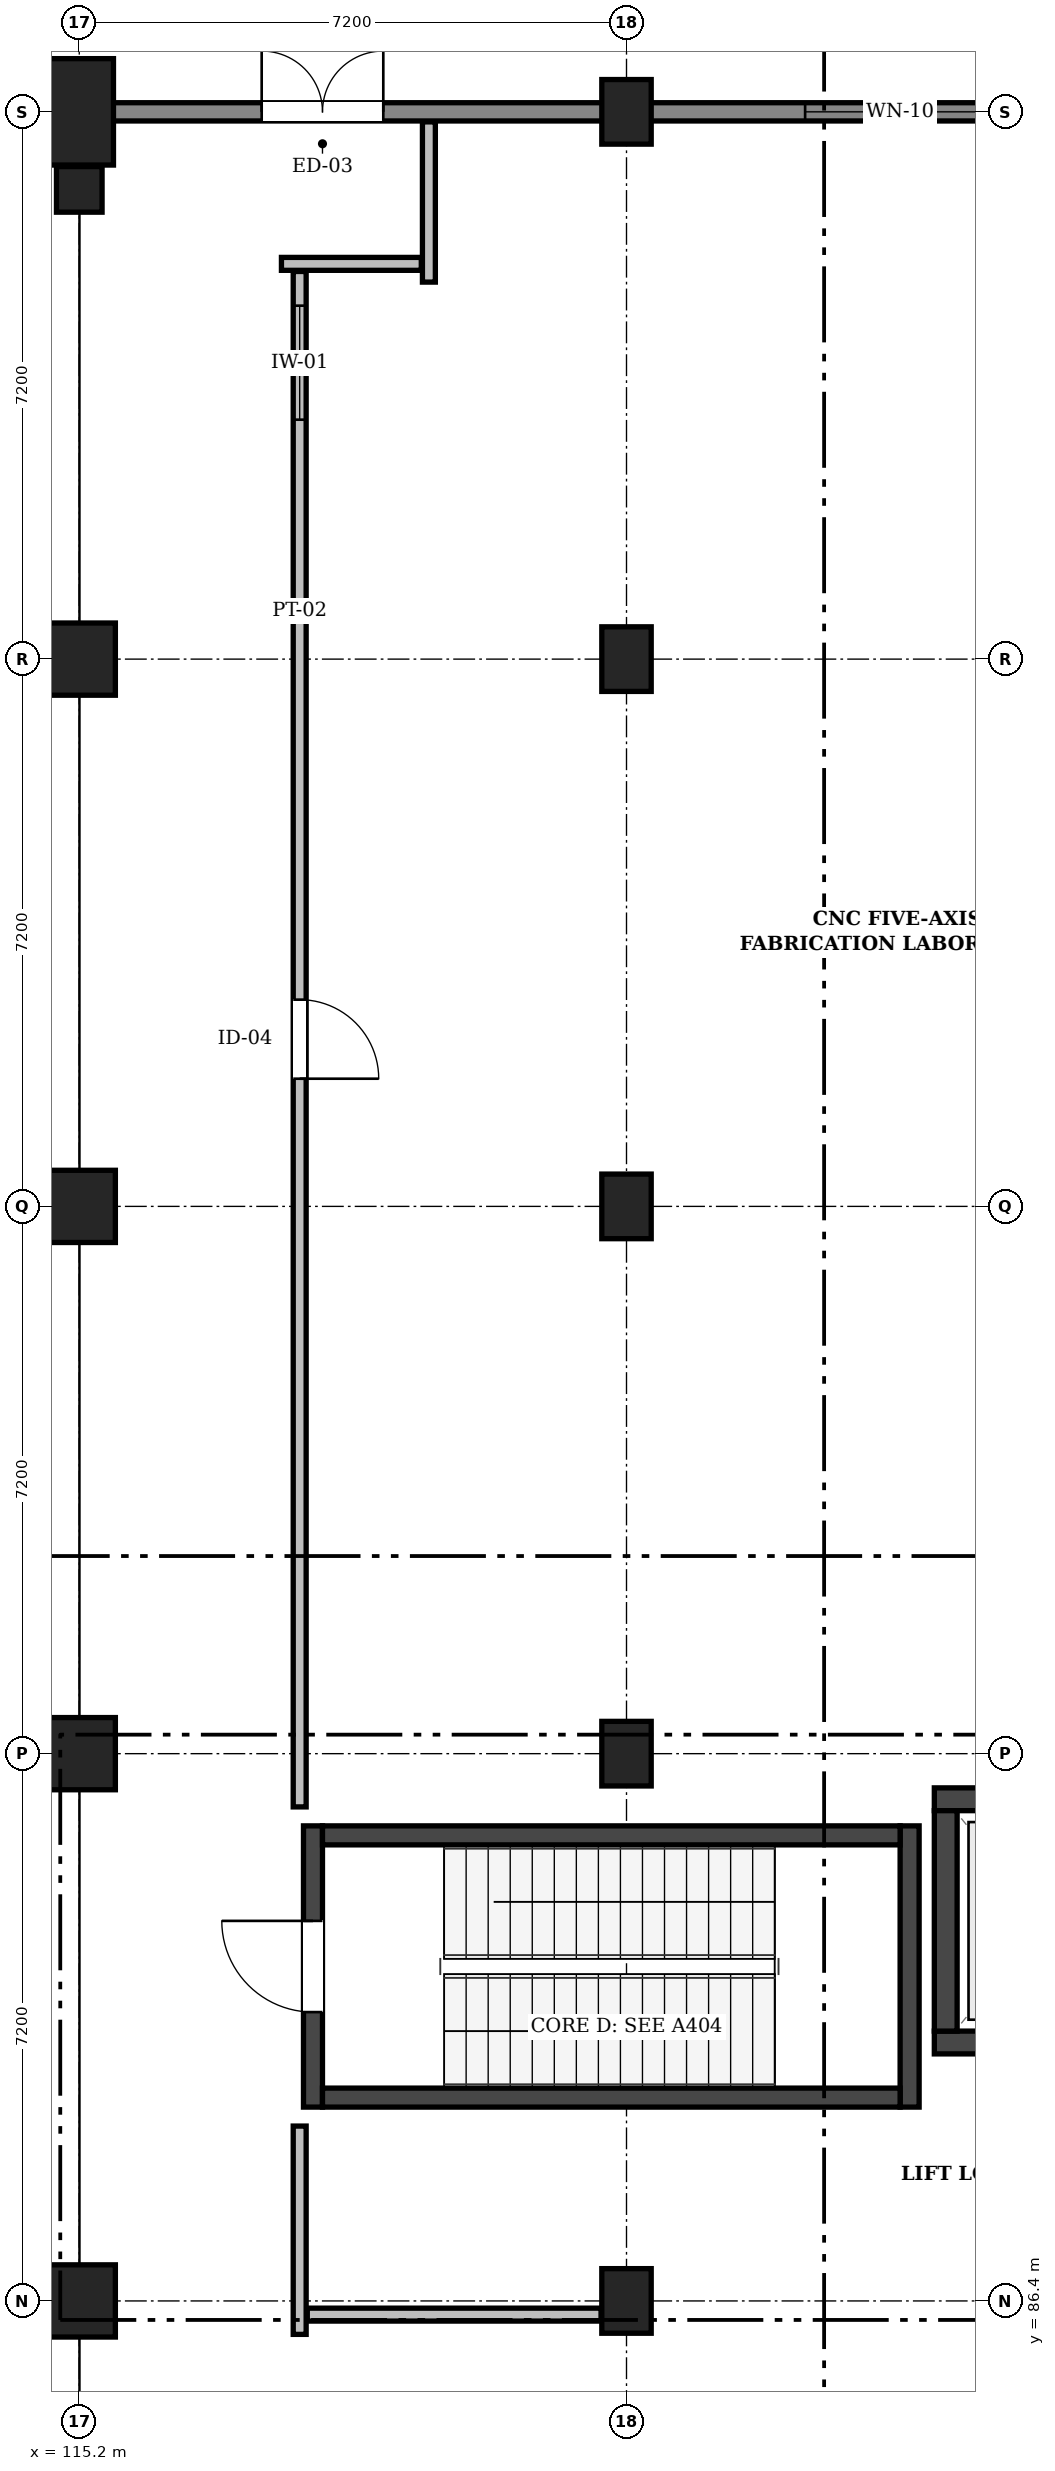
"""IFC4 building model, lengths in metres.
Left out: names, types, materials, properties, quantities, classifications, styles, units other than length and angle.
Written with IfcOpenShell. Run it as: python <this file> out.ifc"""

import sys

from ifc_helpers import new_model, si_unit, direction, frame, frame_2d, origin, origin_2d, place, context, subcontext, project, spatial, rectangle, extrude, element, fill, save


model = new_model("IFC4")
c1 = context("Model", 3, precision=1e-05, world=origin(), true_north=direction((0.0, 1.0)))
c2 = subcontext(c1, "Body", "Model", "MODEL_VIEW")
j1 = project(units=[si_unit("LENGTHUNIT", "METRE"), si_unit("PLANEANGLEUNIT", "RADIAN")], contexts=[c1])
p1 = place(None, origin())
s1 = spatial("IfcSite", under=j1, at=p1, CompositionType="ELEMENT")
p2 = place(p1, origin())
s2 = spatial("IfcBuilding", under=s1, at=p2, CompositionType="ELEMENT")
p3 = place(p2, origin())
s3 = spatial("IfcBuildingStorey", under=s2, at=p3, CompositionType="ELEMENT", Elevation=0.0)
for number, where, z_axis, x_axis in (
    (1, (115.2, 86.4, 0.0), (0.0, 0.0, 1.0), (1.0, 0.0, 0.0)),
    (2, (115.2, 93.6, 0.0), (0.0, 0.0, 1.0), (1.0, 0.0, 0.0)),
    (3, (115.2, 100.8, 0.0), (0.0, 0.0, 1.0), (1.0, 0.0, 0.0)),
    (4, (115.2, 108.0, 0.0), (0.0, 0.0, 1.0), (1.0, 0.0, 0.0)),
):
    element("IfcColumn", number, at=place(p3, frame(where, z_axis=z_axis, x_axis=x_axis)), inside=s3, PredefinedType="COLUMN", context=c2, shape_type="SweptSolid", body=[
        extrude(rectangle(XDim=0.95, YDim=0.95, at=origin_2d()), origin(), (0.0, 0.0, 1.0), 4.8),
    ])
p4 = place(p3, frame((115.2, 115.2, 0.0), z_axis=(0.0, 0.0, 1.0), x_axis=(1.0, 0.0, 0.0)))
e5 = element("IfcColumn", 5, at=p4, inside=s3, PredefinedType="COLUMN", context=c2, shape_type="SweptSolid", body=[
    extrude(rectangle(XDim=0.9, YDim=1.4, at=origin_2d()), origin(), (0.0, 0.0, 1.0), 4.8),
])
for number, where, z_axis, x_axis in (
    (6, (122.4, 86.4, 0.0), (0.0, 0.0, 1.0), (1.0, 0.0, 0.0)),
    (7, (122.4, 93.6, 0.0), (0.0, 0.0, 1.0), (1.0, 0.0, 0.0)),
    (8, (122.4, 100.8, 0.0), (0.0, 0.0, 1.0), (1.0, 0.0, 0.0)),
    (9, (122.4, 108.0, 0.0), (0.0, 0.0, 1.0), (1.0, 0.0, 0.0)),
    (10, (122.4, 115.2, 0.0), (0.0, 0.0, 1.0), (1.0, 0.0, 0.0)),
):
    element("IfcColumn", number, at=place(p3, frame(where, z_axis=z_axis, x_axis=x_axis)), inside=s3, PredefinedType="COLUMN", context=c2, shape_type="SweptSolid", body=[
        extrude(rectangle(XDim=0.65, YDim=0.85, at=origin_2d()), origin(), (0.0, 0.0, 1.0), 4.8),
    ])
p5 = place(p3, frame((115.2, 114.18, 0.0), z_axis=(0.0, 0.0, 1.0), x_axis=(1.0, 0.0, 0.0)))
e11 = element("IfcColumn", 11, at=p5, inside=s3, PredefinedType="COLUMN", context=c2, shape_type="SweptSolid", body=[
    extrude(rectangle(XDim=0.6, YDim=0.6, at=origin_2d()), origin(), (0.0, 0.0, 1.0), 4.8),
])
p6 = place(p3, frame((108.0, 115.2, 0.0), z_axis=(0.0, 0.0, 1.0), x_axis=(1.0, 0.0, 0.0)))
e12 = element("IfcWall", 12, at=p6, inside=s3, PredefinedType="SOLIDWALL", context=c2, shape_type="SweptSolid", body=[
    extrude(rectangle(XDim=7.2, YDim=0.24, at=frame_2d((3.6, 0.0))), origin(), (0.0, 0.0, 1.0), 4.52),
])
p7 = place(p3, frame((115.2, 115.2, 0.0), z_axis=(0.0, 0.0, 1.0), x_axis=(1.0, 0.0, 0.0)))
e13 = element("IfcWall", 13, at=p7, inside=s3, PredefinedType="SOLIDWALL", context=c2, shape_type="SweptSolid", body=[
    extrude(rectangle(XDim=7.2, YDim=0.24, at=frame_2d((3.6, 0.0))), origin(), (0.0, 0.0, 1.0), 4.52),
])
p8 = place(p7, frame((2.4, 0.0, 0.0)))
e14 = element("IfcOpeningElement", 14, at=p8, cuts=e13, PredefinedType="OPENING", context=c2, shape_type="SweptSolid", body=[
    extrude(rectangle(XDim=1.6, YDim=2.2, at=frame_2d((0.8, 1.1))), frame((0.0, 0.132, 0.0), z_axis=(0.0, -1.0, 0.0), x_axis=(1.0, 0.0, 0.0)), (0.0, 0.0, 1.0), 0.264),
])
p9 = place(p3, frame((122.4, 115.2, 0.0), z_axis=(0.0, 0.0, 1.0), x_axis=(1.0, 0.0, 0.0)))
e15 = element("IfcWall", 15, at=p9, inside=s3, PredefinedType="SOLIDWALL", context=c2, shape_type="SweptSolid", body=[
    extrude(rectangle(XDim=7.2, YDim=0.24, at=frame_2d((3.6, 0.0))), origin(), (0.0, 0.0, 1.0), 4.52),
])
p10 = place(p9, frame((2.35, 0.0, 0.95)))
e16 = element("IfcOpeningElement", 16, at=p10, cuts=e15, PredefinedType="OPENING", context=c2, shape_type="SweptSolid", body=[
    extrude(rectangle(XDim=2.5, YDim=1.3, at=frame_2d((1.25, 0.65))), frame((0.0, 0.132, 0.0), z_axis=(0.0, -1.0, 0.0), x_axis=(1.0, 0.0, 0.0)), (0.0, 0.0, 1.0), 0.264),
])
p11 = place(p3, frame((126.45, 89.8, 0.0), z_axis=(0.0, 0.0, 1.0), x_axis=(1.0, 0.0, 0.0)))
e17 = element("IfcWall", 17, at=p11, inside=s3, PredefinedType="SHEAR", context=c2, shape_type="SweptSolid", body=[
    extrude(rectangle(XDim=2.9, YDim=0.3, at=frame_2d((1.45, 0.0))), origin(), (0.0, 0.0, 1.0), 4.55),
])
p12 = place(p11, frame((0.75, 0.0, 0.0)))
e18 = element("IfcOpeningElement", 18, at=p12, cuts=e17, PredefinedType="OPENING", context=c2, shape_type="SweptSolid", body=[
    extrude(rectangle(XDim=1.4, YDim=2.2, at=frame_2d((0.7, 1.1))), frame((0.0, 0.162, 0.0), z_axis=(0.0, -1.0, 0.0), x_axis=(1.0, 0.0, 0.0)), (0.0, 0.0, 1.0), 0.324),
])
for number, where, z_axis, x_axis in (
    (19, (126.45, 93.0, 0.0), (0.0, 0.0, 1.0), (1.0, 0.0, 0.0)),
    (20, (126.6, 89.95, 0.0), (0.0, 0.0, 1.0), (0.0, 1.0, 0.0)),
):
    element("IfcWall", number, at=place(p3, frame(where, z_axis=z_axis, x_axis=x_axis)), inside=s3, PredefinedType="SHEAR", context=c2, shape_type="SweptSolid", body=[
        extrude(rectangle(XDim=2.9, YDim=0.3, at=frame_2d((1.45, 0.0))), origin(), (0.0, 0.0, 1.0), 4.55),
    ])
p13 = place(p3, frame((118.275, 88.95, 0.0), z_axis=(0.0, 0.0, 1.0), x_axis=(0.0, 1.0, 0.0)))
e21 = element("IfcWall", 21, at=p13, inside=s3, PredefinedType="SHEAR", context=c2, shape_type="SweptSolid", body=[
    extrude(rectangle(XDim=3.7, YDim=0.25, at=frame_2d((1.85, 0.0))), origin(), (0.0, 0.0, 1.0), 4.55),
])
p14 = place(p13, frame((1.25, 0.0, 0.0)))
e22 = element("IfcOpeningElement", 22, at=p14, cuts=e21, PredefinedType="OPENING", context=c2, shape_type="SweptSolid", body=[
    extrude(rectangle(XDim=1.2, YDim=2.15, at=frame_2d((0.6, 1.075))), frame((0.0, 0.137, 0.0), z_axis=(0.0, -1.0, 0.0), x_axis=(1.0, 0.0, 0.0)), (0.0, 0.0, 1.0), 0.274),
])
p15 = place(p3, frame((126.125, 88.95, 0.0), z_axis=(0.0, 0.0, 1.0), x_axis=(0.0, 1.0, 0.0)))
e23 = element("IfcWall", 23, at=p15, inside=s3, PredefinedType="SHEAR", context=c2, shape_type="SweptSolid", body=[
    extrude(rectangle(XDim=3.7, YDim=0.25, at=frame_2d((1.85, 0.0))), origin(), (0.0, 0.0, 1.0), 4.55),
])
for number, where, z_axis, x_axis in (
    (24, (118.4, 89.075, 0.0), (0.0, 0.0, 1.0), (1.0, 0.0, 0.0)),
    (25, (118.4, 92.525, 0.0), (0.0, 0.0, 1.0), (1.0, 0.0, 0.0)),
):
    element("IfcWall", number, at=place(p3, frame(where, z_axis=z_axis, x_axis=x_axis)), inside=s3, PredefinedType="SHEAR", context=c2, shape_type="SweptSolid", body=[
        extrude(rectangle(XDim=7.6, YDim=0.25, at=frame_2d((3.8, 0.0))), origin(), (0.0, 0.0, 1.0), 4.55),
    ])
p16 = place(p3, frame((119.8, 112.96, 0.0), z_axis=(0.0, 0.0, 1.0), x_axis=(0.0, 1.0, 0.0)))
e26 = element("IfcWall", 26, at=p16, inside=s3, PredefinedType="PARTITIONING", context=c2, shape_type="SweptSolid", body=[
    extrude(rectangle(XDim=2.108, YDim=0.17, at=frame_2d((1.054, 0.0))), origin(), (0.0, 0.0, 1.0), 4.46),
])
p17 = place(p3, frame((117.86, 113.2, 0.0), z_axis=(0.0, 0.0, 1.0), x_axis=(1.0, 0.0, 0.0)))
e27 = element("IfcWall", 27, at=p17, inside=s3, PredefinedType="PARTITIONING", context=c2, shape_type="SweptSolid", body=[
    extrude(rectangle(XDim=1.84, YDim=0.17, at=frame_2d((0.92, 0.0))), origin(), (0.0, 0.0, 1.0), 4.46),
])
p18 = place(p3, frame((118.1, 92.899, 0.0), z_axis=(0.0, 0.0, 1.0), x_axis=(0.0, 1.0, 0.0)))
e28 = element("IfcWall", 28, at=p18, inside=s3, PredefinedType="PARTITIONING", context=c2, shape_type="SweptSolid", body=[
    extrude(rectangle(XDim=20.201, YDim=0.17, at=frame_2d((10.1, 0.0))), origin(), (0.0, 0.0, 1.0), 4.46),
])
p19 = place(p18, frame((9.58, 0.0, 0.0)))
e29 = element("IfcOpeningElement", 29, at=p19, cuts=e28, PredefinedType="OPENING", context=c2, shape_type="SweptSolid", body=[
    extrude(rectangle(XDim=1.04, YDim=2.18, at=frame_2d((0.52, 1.09))), frame((0.0, 0.097, 0.0), z_axis=(0.0, -1.0, 0.0), x_axis=(1.0, 0.0, 0.0)), (0.0, 0.0, 1.0), 0.194),
])
p20 = place(p18, frame((18.25, 0.0, 1.05)))
e30 = element("IfcOpeningElement", 30, at=p20, cuts=e28, PredefinedType="OPENING", context=c2, shape_type="SweptSolid", body=[
    extrude(rectangle(XDim=1.5, YDim=1.05, at=frame_2d((0.75, 0.525))), frame((0.0, 0.097, 0.0), z_axis=(0.0, -1.0, 0.0), x_axis=(1.0, 0.0, 0.0)), (0.0, 0.0, 1.0), 0.194),
])
p21 = place(p3, frame((118.1, 85.96, 0.0), z_axis=(0.0, 0.0, 1.0), x_axis=(0.0, 1.0, 0.0)))
e31 = element("IfcWall", 31, at=p21, inside=s3, PredefinedType="PARTITIONING", context=c2, shape_type="SweptSolid", body=[
    extrude(rectangle(XDim=2.74, YDim=0.17, at=frame_2d((1.37, 0.0))), origin(), (0.0, 0.0, 1.0), 4.46),
])
p22 = place(p3, frame((118.2, 86.22, 0.0), z_axis=(0.0, 0.0, 1.0), x_axis=(1.0, 0.0, 0.0)))
e32 = element("IfcWall", 32, at=p22, inside=s3, PredefinedType="PARTITIONING", context=c2, shape_type="SweptSolid", body=[
    extrude(rectangle(XDim=3.865, YDim=0.17, at=frame_2d((1.933, 0.0))), origin(), (0.0, 0.0, 1.0), 3.8),
])
p23 = place(p8, origin())
e33 = element("IfcDoor", 33, at=p23, inside=s3, OperationType="DOUBLE_DOOR_SINGLE_SWING", PredefinedType="DOOR", context=c2, shape_type="SweptSolid", body=[
    extrude(rectangle(XDim=1.6, YDim=2.2, at=frame_2d((0.8, 1.1))), frame((0.0, 0.025, 0.0), z_axis=(0.0, -1.0, 0.0), x_axis=(1.0, 0.0, 0.0)), (0.0, 0.0, 1.0), 0.05),
])
fill(e14, e33)
p24 = place(p10, origin())
e34 = element("IfcWindow", 34, at=p24, inside=s3, PartitioningType="SINGLE_PANEL", PredefinedType="WINDOW", context=c2, shape_type="SweptSolid", body=[
    extrude(rectangle(XDim=2.5, YDim=1.3, at=frame_2d((1.25, 0.65))), frame((0.0, 0.03, 0.0), z_axis=(0.0, -1.0, 0.0), x_axis=(1.0, 0.0, 0.0)), (0.0, 0.0, 1.0), 0.06),
])
fill(e16, e34)
p25 = place(p14, origin())
e35 = element("IfcDoor", 35, at=p25, inside=s3, OperationType="SINGLE_SWING_RIGHT", PredefinedType="DOOR", context=c2, shape_type="SweptSolid", body=[
    extrude(rectangle(XDim=1.2, YDim=2.15, at=frame_2d((0.6, 1.075))), frame((0.0, 0.025, 0.0), z_axis=(0.0, -1.0, 0.0), x_axis=(1.0, 0.0, 0.0)), (0.0, 0.0, 1.0), 0.05),
])
fill(e22, e35)
p26 = place(p19, frame((1.04, 0.0, 0.0), z_axis=(0.0, 0.0, 1.0), x_axis=(-1.0, 0.0, 0.0)))
e36 = element("IfcDoor", 36, at=p26, inside=s3, OperationType="SINGLE_SWING_RIGHT", PredefinedType="DOOR", context=c2, shape_type="SweptSolid", body=[
    extrude(rectangle(XDim=1.04, YDim=2.18, at=frame_2d((0.52, 1.09))), frame((0.0, 0.025, 0.0), z_axis=(0.0, -1.0, 0.0), x_axis=(1.0, 0.0, 0.0)), (0.0, 0.0, 1.0), 0.05),
])
fill(e29, e36)
p27 = place(p20, origin())
e37 = element("IfcWindow", 37, at=p27, inside=s3, PartitioningType="SINGLE_PANEL", PredefinedType="WINDOW", context=c2, shape_type="SweptSolid", body=[
    extrude(rectangle(XDim=1.5, YDim=1.05, at=frame_2d((0.75, 0.525))), frame((0.0, 0.03, 0.0), z_axis=(0.0, -1.0, 0.0), x_axis=(1.0, 0.0, 0.0)), (0.0, 0.0, 1.0), 0.06),
])
fill(e30, e37)
save(model, sys.argv[1])
